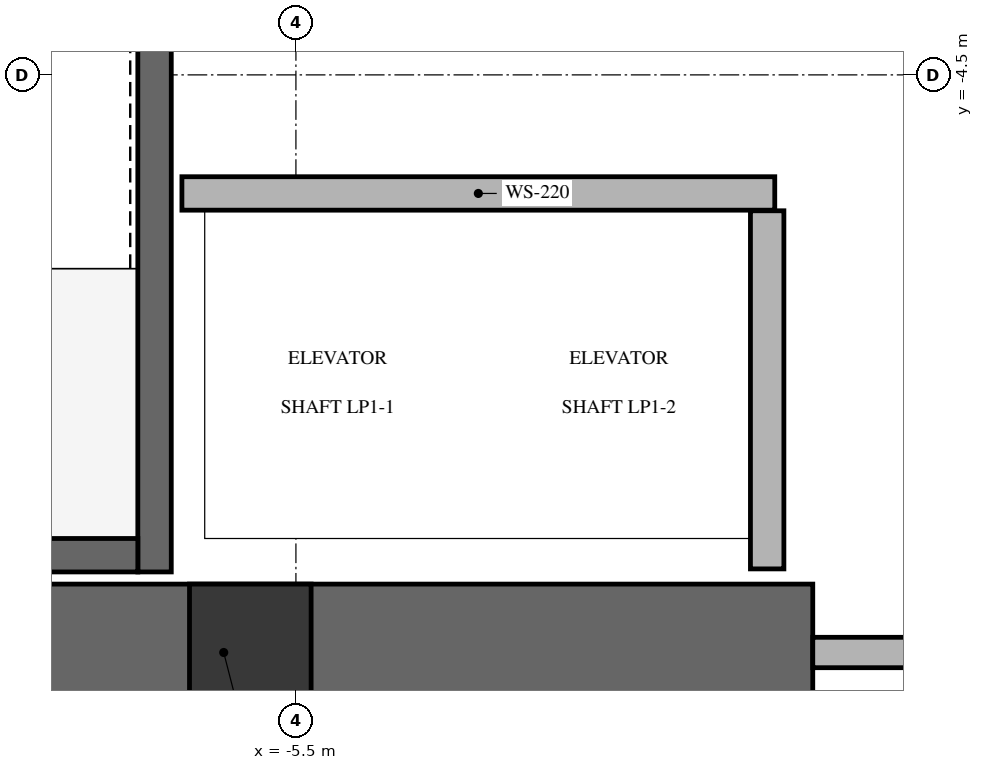
"""IFC4 building model, lengths in metres.
Left out: names, types, materials, properties, quantities, classifications, styles, units other than length and angle.
Written with IfcOpenShell. Run it as: python <this file> out.ifc"""

import sys

from ifc_helpers import new_model, si_unit, direction, frame, frame_2d, origin, origin_2d, place, context, subcontext, project, spatial, rectangle, extrude, source, transform, mapped, element, save


model = new_model("IFC4")
c1 = context("Model", 3, precision=1e-05, world=origin(), true_north=direction((0.0, 1.0)))
c2 = subcontext(c1, "Body", "Model", "MODEL_VIEW")
j1 = project(units=[si_unit("LENGTHUNIT", "METRE"), si_unit("PLANEANGLEUNIT", "RADIAN")], contexts=[c1])
p1 = place(None, origin())
s1 = spatial("IfcSite", under=j1, at=p1, CompositionType="ELEMENT")
p2 = place(p1, origin())
s2 = spatial("IfcBuilding", under=s1, at=p2, CompositionType="ELEMENT")
p3 = place(p2, frame((0.0, 0.0, 15.6)))
s3 = spatial("IfcBuildingStorey", under=s2, at=p3, CompositionType="ELEMENT", Elevation=15.6)
p4 = place(p3, frame((-9.85, -8.3, 0.0), z_axis=(0.0, 0.0, 1.0), x_axis=(1.0, 0.0, 0.0)))
e1 = element("IfcWall", 1, at=p4, inside=s3, PredefinedType="SHEAR", context=c2, shape_type="SweptSolid", body=[
    extrude(rectangle(XDim=7.75, YDim=0.9, at=frame_2d((3.875, 0.0))), origin(), (0.0, 0.0, 1.0), 5.6),
])
p5 = place(p3, frame((-6.43, -7.77, -0.32), z_axis=(0.0, 0.0, 1.0), x_axis=(0.0, 1.0, 0.0)))
e2 = element("IfcWall", 2, at=p5, inside=s3, PredefinedType="SHEAR", context=c2, shape_type="SweptSolid", body=[
    extrude(rectangle(XDim=7.89, YDim=0.22, at=frame_2d((3.945, 0.0))), origin(), (0.0, 0.0, 1.0), 5.6),
])
p6 = place(p5, frame((6.32, 0.0, 0.0)))
e3 = element("IfcOpeningElement", 3, at=p6, cuts=e2, PredefinedType="OPENING", context=c2, shape_type="SweptSolid", body=[
    extrude(rectangle(XDim=1.05, YDim=2.15, at=frame_2d((0.525, 1.075))), frame((0.0, 0.12, 0.0), z_axis=(0.0, -1.0, 0.0), x_axis=(1.0, 0.0, 0.0)), (0.0, 0.0, 1.0), 0.24),
])
p7 = place(p3, frame((-9.5, -7.66, -0.32), z_axis=(0.0, 0.0, 1.0), x_axis=(1.0, 0.0, 0.0)))
e4 = element("IfcWall", 4, at=p7, inside=s3, PredefinedType="SHEAR", context=c2, shape_type="SweptSolid", body=[
    extrude(rectangle(XDim=2.96, YDim=0.22, at=frame_2d((1.48, 0.0))), origin(), (0.0, 0.0, 1.0), 5.6),
])
m1 = source(origin(), c2, "Body", "SweptSolid", [
    extrude(rectangle(XDim=0.8, YDim=0.8, at=origin_2d()), origin(), (0.0, 0.0, 1.0), 5.6),
])
p8 = place(p3, frame((-5.8, -8.25, -0.32), z_axis=(0.0, 0.0, 1.0), x_axis=(1.0, 0.0, 0.0)))
e5 = element("IfcColumn", 5, at=p8, inside=s3, PredefinedType="PILASTER", context=c2, shape_type="MappedRepresentation", body=[
    mapped(m1, transform((0.0, 0.0, 0.0), x_axis=(1.0, 0.0, 0.0), y_axis=(0.0, 1.0, 0.0), z_axis=(0.0, 0.0, 1.0), scale=1.0)),
])
p9 = place(p3, frame((-2.1, -8.3, 0.0), z_axis=(0.0, 0.0, 1.0), x_axis=(1.0, 0.0, 0.0)))
e6 = element("IfcWall", 6, at=p9, inside=s3, PredefinedType="SOLIDWALL", context=c2, shape_type="SweptSolid", body=[
    extrude(rectangle(XDim=4.2, YDim=0.2, at=frame_2d((2.1, 0.0))), origin(), (0.0, 0.0, 1.0), 5.265),
])
p10 = place(p9, frame((1.2, 0.0, 0.0)))
e7 = element("IfcOpeningElement", 7, at=p10, cuts=e6, PredefinedType="OPENING", context=c2, shape_type="SweptSolid", body=[
    extrude(rectangle(XDim=1.8, YDim=2.15, at=frame_2d((0.9, 1.075))), frame((0.0, 0.11, 0.0), z_axis=(0.0, -1.0, 0.0), x_axis=(1.0, 0.0, 0.0)), (0.0, 0.0, 1.0), 0.22),
])
p11 = place(p3, frame((-6.25, -5.28, 0.0), z_axis=(0.0, 0.0, 1.0), x_axis=(1.0, 0.0, 0.0)))
e8 = element("IfcWall", 8, at=p11, inside=s3, PredefinedType="SOLIDWALL", context=c2, shape_type="SweptSolid", body=[
    extrude(rectangle(XDim=3.9, YDim=0.22, at=frame_2d((1.95, 0.0))), origin(), (0.0, 0.0, 1.0), 5.265),
])
p12 = place(p3, frame((-2.4, -7.75, 0.0), z_axis=(0.0, 0.0, 1.0), x_axis=(0.0, 1.0, 0.0)))
e9 = element("IfcWall", 9, at=p12, inside=s3, PredefinedType="SOLIDWALL", context=c2, shape_type="SweptSolid", body=[
    extrude(rectangle(XDim=2.356, YDim=0.22, at=frame_2d((1.178, 0.0))), origin(), (0.0, 0.0, 1.0), 5.265),
])
save(model, sys.argv[1])
